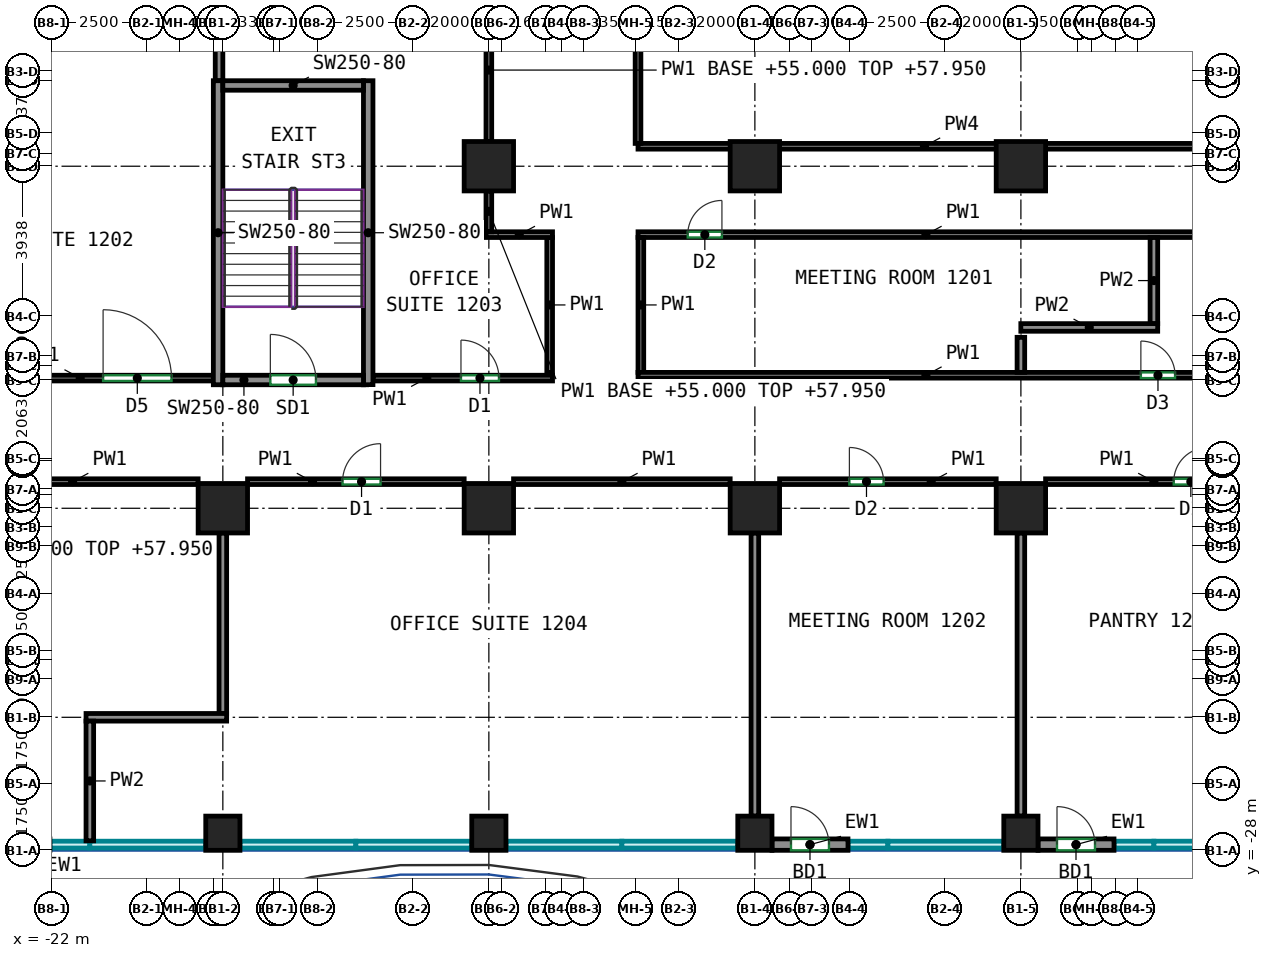
"""IFC4 building model, lengths in metres.
Left out: names, types, materials, properties, quantities, classifications, styles, units other than length and angle.
Written with IfcOpenShell. Run it as: python <this file> out.ifc"""

import sys

from ifc_helpers import new_model, si_unit, direction, frame, frame_2d, origin, origin_2d, place, context, subcontext, project, spatial, rectangle, extrude, source, transform, mapped, element, fill, save


model = new_model("IFC4")
c1 = context("Model", 3, precision=1e-05, world=origin(), true_north=direction((0.0, 1.0)))
c2 = subcontext(c1, "Body", "Model", "MODEL_VIEW")
j1 = project(units=[si_unit("LENGTHUNIT", "METRE"), si_unit("PLANEANGLEUNIT", "RADIAN")], contexts=[c1])
p1 = place(None, origin())
s1 = spatial("IfcSite", under=j1, at=p1, CompositionType="ELEMENT")
p2 = place(p1, origin())
s2 = spatial("IfcBuilding", under=s1, at=p2, CompositionType="ELEMENT")
p3 = place(p2, frame((0.0, 0.0, 55.0)))
s3 = spatial("IfcBuildingStorey", under=s2, at=p3, CompositionType="ELEMENT", Elevation=55.0)
m1 = source(origin(), c2, "Body", "SweptSolid", [
    extrude(rectangle(XDim=0.9, YDim=0.9, at=origin_2d()), origin(), (0.0, 0.0, 1.0), 3.6),
])
p4 = place(p3, frame((-17.5, -27.55, 0.0), z_axis=(0.0, 0.0, 1.0), x_axis=(1.0, 0.0, 0.0)))
e1 = element("IfcColumn", 1, at=p4, inside=s3, PredefinedType="COLUMN", context=c2, shape_type="MappedRepresentation", body=[
    mapped(m1, transform((0.0, 0.0, 0.0))),
])
m2 = source(origin(), c2, "Body", "SweptSolid", [
    extrude(rectangle(XDim=1.3, YDim=1.3, at=origin_2d()), origin(), (0.0, 0.0, 1.0), 3.6),
])
p5 = place(p3, frame((-17.5, -19.0, 0.0), z_axis=(0.0, 0.0, 1.0), x_axis=(1.0, 0.0, 0.0)))
e2 = element("IfcColumn", 2, at=p5, inside=s3, PredefinedType="COLUMN", context=c2, shape_type="MappedRepresentation", body=[
    mapped(m2, transform((0.0, 0.0, 0.0))),
])
p6 = place(p3, frame((-10.5, -27.55, 0.0), z_axis=(0.0, 0.0, 1.0), x_axis=(1.0, 0.0, 0.0)))
e3 = element("IfcColumn", 3, at=p6, inside=s3, PredefinedType="COLUMN", context=c2, shape_type="MappedRepresentation", body=[
    mapped(m1, transform((0.0, 0.0, 0.0))),
])
for number, where, z_axis, x_axis in (
    (4, (-10.5, -19.0, 0.0), (0.0, 0.0, 1.0), (1.0, 0.0, 0.0)),
    (5, (-10.5, -10.0, 0.0), (0.0, 0.0, 1.0), (1.0, 0.0, 0.0)),
):
    element("IfcColumn", number, at=place(p3, frame(where, z_axis=z_axis, x_axis=x_axis)), inside=s3, PredefinedType="COLUMN", context=c2, shape_type="MappedRepresentation", body=[
        mapped(m2, transform((0.0, 0.0, 0.0))),
    ])
p7 = place(p3, frame((-3.5, -27.55, 0.0), z_axis=(0.0, 0.0, 1.0), x_axis=(1.0, 0.0, 0.0)))
e6 = element("IfcColumn", 6, at=p7, inside=s3, PredefinedType="COLUMN", context=c2, shape_type="MappedRepresentation", body=[
    mapped(m1, transform((0.0, 0.0, 0.0))),
])
for number, where, z_axis, x_axis in (
    (7, (-3.5, -19.0, 0.0), (0.0, 0.0, 1.0), (1.0, 0.0, 0.0)),
    (8, (-3.5, -10.0, 0.0), (0.0, 0.0, 1.0), (1.0, 0.0, 0.0)),
):
    element("IfcColumn", number, at=place(p3, frame(where, z_axis=z_axis, x_axis=x_axis)), inside=s3, PredefinedType="COLUMN", context=c2, shape_type="MappedRepresentation", body=[
        mapped(m2, transform((0.0, 0.0, 0.0))),
    ])
p8 = place(p3, frame((3.5, -27.55, 0.0), z_axis=(0.0, 0.0, 1.0), x_axis=(1.0, 0.0, 0.0)))
e9 = element("IfcColumn", 9, at=p8, inside=s3, PredefinedType="COLUMN", context=c2, shape_type="MappedRepresentation", body=[
    mapped(m1, transform((0.0, 0.0, 0.0))),
])
for number, where, z_axis, x_axis in (
    (10, (3.5, -19.0, 0.0), (0.0, 0.0, 1.0), (1.0, 0.0, 0.0)),
    (11, (3.5, -10.0, 0.0), (0.0, 0.0, 1.0), (1.0, 0.0, 0.0)),
):
    element("IfcColumn", number, at=place(p3, frame(where, z_axis=z_axis, x_axis=x_axis)), inside=s3, PredefinedType="COLUMN", context=c2, shape_type="MappedRepresentation", body=[
        mapped(m2, transform((0.0, 0.0, 0.0))),
    ])
m3 = source(origin(), c2, "Body", "SweptSolid", [
    extrude(rectangle(XDim=8.0, YDim=0.25, at=frame_2d((4.0, 0.0))), origin(), (0.0, 0.0, 1.0), 3.6),
])
for number, where, z_axis, x_axis in (
    (12, (-17.625, -15.75, 0.0), (0.0, 0.0, 1.0), (0.0, 1.0, 0.0)),
    (13, (-13.675, -15.75, 0.0), (0.0, 0.0, 1.0), (0.0, 1.0, 0.0)),
):
    element("IfcWall", number, at=place(p3, frame(where, z_axis=z_axis, x_axis=x_axis)), inside=s3, PredefinedType="SHEAR", context=c2, shape_type="MappedRepresentation", body=[
        mapped(m3, transform((0.0, 0.0, 0.0))),
    ])
m4 = source(origin(), c2, "Body", "SweptSolid", [
    extrude(rectangle(XDim=3.7, YDim=0.25, at=frame_2d((1.85, 0.0))), origin(), (0.0, 0.0, 1.0), 3.6),
])
p9 = place(p3, frame((-17.5, -15.625, 0.0), z_axis=(0.0, 0.0, 1.0), x_axis=(1.0, 0.0, 0.0)))
e14 = element("IfcWall", 14, at=p9, inside=s3, PredefinedType="SHEAR", context=c2, shape_type="MappedRepresentation", body=[
    mapped(m4, transform((0.0, 0.0, 0.0))),
])
p10 = place(p9, frame((1.25, 0.0, 0.0)))
e15 = element("IfcOpeningElement", 15, at=p10, cuts=e14, PredefinedType="OPENING", context=c2, shape_type="SweptSolid", body=[
    extrude(rectangle(XDim=1.2, YDim=2.1, at=frame_2d((0.6, 1.05))), frame((0.0, 0.135, 0.0), z_axis=(0.0, -1.0, 0.0), x_axis=(1.0, 0.0, 0.0)), (0.0, 0.0, 1.0), 0.27),
])
p11 = place(p3, frame((-17.5, -7.875, 0.0), z_axis=(0.0, 0.0, 1.0), x_axis=(1.0, 0.0, 0.0)))
e16 = element("IfcWall", 16, at=p11, inside=s3, PredefinedType="SHEAR", context=c2, shape_type="MappedRepresentation", body=[
    mapped(m4, transform((0.0, 0.0, 0.0))),
])
m5 = source(origin(), c2, "Body", "SweptSolid", [
    extrude(rectangle(XDim=2.0, YDim=0.3, at=frame_2d((1.0, 0.0))), origin(), (0.0, 0.0, 1.0), 3.6),
])
p12 = place(p3, frame((-3.05, -27.85, 0.0), z_axis=(0.0, 0.0, 1.0), x_axis=(1.0, 0.0, 0.0)))
e17 = element("IfcWall", 17, at=p12, inside=s3, PredefinedType="SOLIDWALL", context=c2, shape_type="MappedRepresentation", body=[
    mapped(m5, transform((0.0, 0.0, 0.0))),
])
p13 = place(p12, frame((0.5, 0.0, 0.0)))
e18 = element("IfcOpeningElement", 18, at=p13, cuts=e17, PredefinedType="OPENING", context=c2, shape_type="SweptSolid", body=[
    extrude(rectangle(XDim=1.0, YDim=2.1, at=frame_2d((0.5, 1.05))), frame((0.0, 0.16, 0.0), z_axis=(0.0, -1.0, 0.0), x_axis=(1.0, 0.0, 0.0)), (0.0, 0.0, 1.0), 0.32),
])
p14 = place(p3, frame((3.95, -27.85, 0.0), z_axis=(0.0, 0.0, 1.0), x_axis=(1.0, 0.0, 0.0)))
e19 = element("IfcWall", 19, at=p14, inside=s3, PredefinedType="SOLIDWALL", context=c2, shape_type="MappedRepresentation", body=[
    mapped(m5, transform((0.0, 0.0, 0.0))),
])
p15 = place(p14, frame((0.5, 0.0, 0.0)))
e20 = element("IfcOpeningElement", 20, at=p15, cuts=e19, PredefinedType="OPENING", context=c2, shape_type="SweptSolid", body=[
    extrude(rectangle(XDim=1.0, YDim=2.1, at=frame_2d((0.5, 1.05))), frame((0.0, 0.16, 0.0), z_axis=(0.0, -1.0, 0.0), x_axis=(1.0, 0.0, 0.0)), (0.0, 0.0, 1.0), 0.32),
])
p16 = place(p3, frame((-24.757, -18.3, 0.0), z_axis=(0.0, 0.0, 1.0), x_axis=(1.0, 0.0, 0.0)))
e21 = element("IfcWall", 21, at=p16, inside=s3, PredefinedType="PARTITIONING", context=c2, shape_type="SweptSolid", body=[
    extrude(rectangle(XDim=6.607, YDim=0.15, at=frame_2d((3.304, 0.0))), origin(), (0.0, 0.0, 1.0), 3.6),
])
p17 = place(p3, frame((-24.757, -15.575, 0.0), z_axis=(0.0, 0.0, 1.0), x_axis=(1.0, 0.0, 0.0)))
e22 = element("IfcWall", 22, at=p17, inside=s3, PredefinedType="PARTITIONING", context=c2, shape_type="SweptSolid", body=[
    extrude(rectangle(XDim=7.007, YDim=0.15, at=frame_2d((3.503, 0.0))), origin(), (0.0, 0.0, 1.0), 3.6),
])
p18 = place(p17, frame((4.106, 0.0, 0.0)))
e23 = element("IfcOpeningElement", 23, at=p18, cuts=e22, PredefinedType="OPENING", context=c2, shape_type="SweptSolid", body=[
    extrude(rectangle(XDim=1.8, YDim=2.1, at=frame_2d((0.9, 1.05))), frame((0.0, 0.085, 0.0), z_axis=(0.0, -1.0, 0.0), x_axis=(1.0, 0.0, 0.0)), (0.0, 0.0, 1.0), 0.17),
])
p19 = place(p3, frame((-13.55, -15.575, 0.0), z_axis=(0.0, 0.0, 1.0), x_axis=(1.0, 0.0, 0.0)))
e24 = element("IfcWall", 24, at=p19, inside=s3, PredefinedType="PARTITIONING", context=c2, shape_type="SweptSolid", body=[
    extrude(rectangle(XDim=4.725, YDim=0.15, at=frame_2d((2.363, 0.0))), origin(), (0.0, 0.0, 1.0), 3.6),
])
p20 = place(p19, frame((2.316, 0.0, 0.0)))
e25 = element("IfcOpeningElement", 25, at=p20, cuts=e24, PredefinedType="OPENING", context=c2, shape_type="SweptSolid", body=[
    extrude(rectangle(XDim=1.0, YDim=2.1, at=frame_2d((0.5, 1.05))), frame((0.0, 0.085, 0.0), z_axis=(0.0, -1.0, 0.0), x_axis=(1.0, 0.0, 0.0)), (0.0, 0.0, 1.0), 0.17),
])
p21 = place(p3, frame((-8.9, -11.875, 0.0), z_axis=(0.0, 0.0, 1.0), x_axis=(0.0, -1.0, 0.0)))
e26 = element("IfcWall", 26, at=p21, inside=s3, PredefinedType="PARTITIONING", context=c2, shape_type="SweptSolid", body=[
    extrude(rectangle(XDim=3.55, YDim=0.15, at=frame_2d((1.775, 0.0))), origin(), (0.0, 0.0, 1.0), 3.6),
])
p22 = place(p3, frame((-10.575, -11.8, 0.0), z_axis=(0.0, 0.0, 1.0), x_axis=(1.0, 0.0, 0.0)))
e27 = element("IfcWall", 27, at=p22, inside=s3, PredefinedType="PARTITIONING", context=c2, shape_type="SweptSolid", body=[
    extrude(rectangle(XDim=1.75, YDim=0.15, at=frame_2d((0.875, 0.0))), origin(), (0.0, 0.0, 1.0), 3.6),
])
p23 = place(p3, frame((-10.5, -11.725, 0.0), z_axis=(0.0, 0.0, 1.0), x_axis=(0.0, 1.0, 0.0)))
e28 = element("IfcWall", 28, at=p23, inside=s3, PredefinedType="PARTITIONING", context=c2, shape_type="SweptSolid", body=[
    extrude(rectangle(XDim=1.075, YDim=0.15, at=frame_2d((0.538, 0.0))), origin(), (0.0, 0.0, 1.0), 2.95),
])
p24 = place(p3, frame((-10.5, -9.35, 0.0), z_axis=(0.0, 0.0, 1.0), x_axis=(0.0, 1.0, 0.0)))
e29 = element("IfcWall", 29, at=p24, inside=s3, PredefinedType="PARTITIONING", context=c2, shape_type="SweptSolid", body=[
    extrude(rectangle(XDim=3.76, YDim=0.15, at=frame_2d((1.88, 0.0))), origin(), (0.0, 0.0, 1.0), 2.95),
])
p25 = place(p3, frame((-16.85, -18.3, 0.0), z_axis=(0.0, 0.0, 1.0), x_axis=(1.0, 0.0, 0.0)))
e30 = element("IfcWall", 30, at=p25, inside=s3, PredefinedType="PARTITIONING", context=c2, shape_type="SweptSolid", body=[
    extrude(rectangle(XDim=5.7, YDim=0.15, at=frame_2d((2.85, 0.0))), origin(), (0.0, 0.0, 1.0), 3.6),
])
p26 = place(p25, frame((2.5, 0.0, 0.0)))
e31 = element("IfcOpeningElement", 31, at=p26, cuts=e30, PredefinedType="OPENING", context=c2, shape_type="SweptSolid", body=[
    extrude(rectangle(XDim=1.0, YDim=2.1, at=frame_2d((0.5, 1.05))), frame((0.0, 0.085, 0.0), z_axis=(0.0, -1.0, 0.0), x_axis=(1.0, 0.0, 0.0)), (0.0, 0.0, 1.0), 0.17),
])
p27 = place(p3, frame((-9.85, -18.3, 0.0), z_axis=(0.0, 0.0, 1.0), x_axis=(1.0, 0.0, 0.0)))
e32 = element("IfcWall", 32, at=p27, inside=s3, PredefinedType="PARTITIONING", context=c2, shape_type="SweptSolid", body=[
    extrude(rectangle(XDim=5.7, YDim=0.15, at=frame_2d((2.85, 0.0))), origin(), (0.0, 0.0, 1.0), 3.6),
])
p28 = place(p3, frame((-6.575, -11.8, 0.0), z_axis=(0.0, 0.0, 1.0), x_axis=(1.0, 0.0, 0.0)))
e33 = element("IfcWall", 33, at=p28, inside=s3, PredefinedType="PARTITIONING", context=c2, shape_type="SweptSolid", body=[
    extrude(rectangle(XDim=15.15, YDim=0.15, at=frame_2d((7.575, 0.0))), origin(), (0.0, 0.0, 1.0), 3.6),
])
p29 = place(p28, frame((1.308, 0.0, 0.0)))
e34 = element("IfcOpeningElement", 34, at=p29, cuts=e33, PredefinedType="OPENING", context=c2, shape_type="SweptSolid", body=[
    extrude(rectangle(XDim=0.9, YDim=2.1, at=frame_2d((0.45, 1.05))), frame((0.0, 0.085, 0.0), z_axis=(0.0, -1.0, 0.0), x_axis=(1.0, 0.0, 0.0)), (0.0, 0.0, 1.0), 0.17),
])
p30 = place(p3, frame((-6.5, -15.425, 0.0), z_axis=(0.0, 0.0, 1.0), x_axis=(0.0, 1.0, 0.0)))
e35 = element("IfcWall", 35, at=p30, inside=s3, PredefinedType="PARTITIONING", context=c2, shape_type="SweptSolid", body=[
    extrude(rectangle(XDim=3.55, YDim=0.15, at=frame_2d((1.775, 0.0))), origin(), (0.0, 0.0, 1.0), 3.6),
])
p31 = place(p3, frame((-6.575, -15.5, 0.0), z_axis=(0.0, 0.0, 1.0), x_axis=(1.0, 0.0, 0.0)))
e36 = element("IfcWall", 36, at=p31, inside=s3, PredefinedType="PARTITIONING", context=c2, shape_type="SweptSolid", body=[
    extrude(rectangle(XDim=15.15, YDim=0.15, at=frame_2d((7.575, 0.0))), origin(), (0.0, 0.0, 1.0), 3.6),
])
p32 = place(p31, frame((13.232, 0.0, 0.0)))
e37 = element("IfcOpeningElement", 37, at=p32, cuts=e36, PredefinedType="OPENING", context=c2, shape_type="SweptSolid", body=[
    extrude(rectangle(XDim=0.9, YDim=2.1, at=frame_2d((0.45, 1.05))), frame((0.0, 0.085, 0.0), z_axis=(0.0, -1.0, 0.0), x_axis=(1.0, 0.0, 0.0)), (0.0, 0.0, 1.0), 0.17),
])
p33 = place(p3, frame((-2.85, -18.3, 0.0), z_axis=(0.0, 0.0, 1.0), x_axis=(1.0, 0.0, 0.0)))
e38 = element("IfcWall", 38, at=p33, inside=s3, PredefinedType="PARTITIONING", context=c2, shape_type="SweptSolid", body=[
    extrude(rectangle(XDim=5.7, YDim=0.15, at=frame_2d((2.85, 0.0))), origin(), (0.0, 0.0, 1.0), 3.6),
])
p34 = place(p33, frame((1.837, 0.0, 0.0)))
e39 = element("IfcOpeningElement", 39, at=p34, cuts=e38, PredefinedType="OPENING", context=c2, shape_type="SweptSolid", body=[
    extrude(rectangle(XDim=0.9, YDim=2.1, at=frame_2d((0.45, 1.05))), frame((0.0, 0.085, 0.0), z_axis=(0.0, -1.0, 0.0), x_axis=(1.0, 0.0, 0.0)), (0.0, 0.0, 1.0), 0.17),
])
p35 = place(p3, frame((4.15, -18.3, 0.0), z_axis=(0.0, 0.0, 1.0), x_axis=(1.0, 0.0, 0.0)))
e40 = element("IfcWall", 40, at=p35, inside=s3, PredefinedType="PARTITIONING", context=c2, shape_type="SweptSolid", body=[
    extrude(rectangle(XDim=5.7, YDim=0.15, at=frame_2d((2.85, 0.0))), origin(), (0.0, 0.0, 1.0), 3.6),
])
p36 = place(p35, frame((3.372, 0.0, 0.0)))
e41 = element("IfcOpeningElement", 41, at=p36, cuts=e40, PredefinedType="OPENING", context=c2, shape_type="SweptSolid", body=[
    extrude(rectangle(XDim=0.9, YDim=2.1, at=frame_2d((0.45, 1.05))), frame((0.0, 0.085, 0.0), z_axis=(0.0, -1.0, 0.0), x_axis=(1.0, 0.0, 0.0)), (0.0, 0.0, 1.0), 0.17),
])
p37 = place(p3, frame((-17.6, -7.75, 0.0), z_axis=(0.0, 0.0, 1.0), x_axis=(0.0, 1.0, 0.0)))
e42 = element("IfcWall", 42, at=p37, inside=s3, PredefinedType="PARTITIONING", context=c2, shape_type="SweptSolid", body=[
    extrude(rectangle(XDim=2.15, YDim=0.2, at=frame_2d((1.075, 0.0))), origin(), (0.0, 0.0, 1.0), 3.6),
])
p38 = place(p3, frame((-17.5, -24.4, 0.0), z_axis=(0.0, 0.0, 1.0), x_axis=(0.0, 1.0, 0.0)))
e43 = element("IfcWall", 43, at=p38, inside=s3, PredefinedType="PARTITIONING", context=c2, shape_type="SweptSolid", body=[
    extrude(rectangle(XDim=4.75, YDim=0.2, at=frame_2d((2.375, 0.0))), origin(), (0.0, 0.0, 1.0), 2.95),
])
p39 = place(p3, frame((-21.1, -24.5, 0.0), z_axis=(0.0, 0.0, 1.0), x_axis=(1.0, 0.0, 0.0)))
e44 = element("IfcWall", 44, at=p39, inside=s3, PredefinedType="PARTITIONING", context=c2, shape_type="SweptSolid", body=[
    extrude(rectangle(XDim=3.7, YDim=0.2, at=frame_2d((1.85, 0.0))), origin(), (0.0, 0.0, 1.0), 2.95),
])
p40 = place(p3, frame((-21.0, -27.75, 0.0), z_axis=(0.0, 0.0, 1.0), x_axis=(0.0, 1.0, 0.0)))
e45 = element("IfcWall", 45, at=p40, inside=s3, PredefinedType="PARTITIONING", context=c2, shape_type="SweptSolid", body=[
    extrude(rectangle(XDim=3.15, YDim=0.2, at=frame_2d((1.575, 0.0))), origin(), (0.0, 0.0, 1.0), 3.6),
])
p41 = place(p3, frame((-3.5, -27.1, 0.0), z_axis=(0.0, 0.0, 1.0), x_axis=(0.0, 1.0, 0.0)))
e46 = element("IfcWall", 46, at=p41, inside=s3, PredefinedType="PARTITIONING", context=c2, shape_type="SweptSolid", body=[
    extrude(rectangle(XDim=7.45, YDim=0.2, at=frame_2d((3.725, 0.0))), origin(), (0.0, 0.0, 1.0), 2.95),
])
p42 = place(p3, frame((7.0, -14.142, 0.0), z_axis=(0.0, 0.0, 1.0), x_axis=(0.0, 1.0, 0.0)))
e47 = element("IfcWall", 47, at=p42, inside=s3, PredefinedType="PARTITIONING", context=c2, shape_type="SweptSolid", body=[
    extrude(rectangle(XDim=2.266, YDim=0.2, at=frame_2d((1.133, 0.0))), origin(), (0.0, 0.0, 1.0), 3.6),
])
p43 = place(p3, frame((3.498, -14.242, 0.0), z_axis=(0.0, 0.0, 1.0), x_axis=(1.0, 0.0, 0.0)))
e48 = element("IfcWall", 48, at=p43, inside=s3, PredefinedType="PARTITIONING", context=c2, shape_type="SweptSolid", body=[
    extrude(rectangle(XDim=3.602, YDim=0.2, at=frame_2d((1.801, 0.0))), origin(), (0.0, 0.0, 1.0), 3.6),
])
p44 = place(p3, frame((3.5, -15.424, 0.0), z_axis=(0.0, 0.0, 1.0), x_axis=(0.0, 1.0, 0.0)))
e49 = element("IfcWall", 49, at=p44, inside=s3, PredefinedType="PARTITIONING", context=c2, shape_type="SweptSolid", body=[
    extrude(rectangle(XDim=0.922, YDim=0.2, at=frame_2d((0.461, 0.0))), origin(), (0.0, 0.0, 1.0), 2.95),
])
p45 = place(p3, frame((3.5, -27.1, 0.0), z_axis=(0.0, 0.0, 1.0), x_axis=(0.0, 1.0, 0.0)))
e50 = element("IfcWall", 50, at=p45, inside=s3, PredefinedType="PARTITIONING", context=c2, shape_type="SweptSolid", body=[
    extrude(rectangle(XDim=7.45, YDim=0.2, at=frame_2d((3.725, 0.0))), origin(), (0.0, 0.0, 1.0), 2.95),
])
p46 = place(p3, frame((8.5, -9.475, 0.0), z_axis=(0.0, 0.0, 1.0), x_axis=(-1.0, 0.0, 0.0)))
e51 = element("IfcWall", 51, at=p46, inside=s3, PredefinedType="PARTITIONING", context=c2, shape_type="SweptSolid", body=[
    extrude(rectangle(XDim=15.075, YDim=0.15, at=frame_2d((7.538, 0.0))), origin(), (0.0, 0.0, 1.0), 3.6),
])
p47 = place(p3, frame((-6.575, -9.4, 0.0), z_axis=(0.0, 0.0, 1.0), x_axis=(0.0, 1.0, 0.0)))
e52 = element("IfcWall", 52, at=p47, inside=s3, PredefinedType="PARTITIONING", context=c2, shape_type="SweptSolid", body=[
    extrude(rectangle(XDim=15.0, YDim=0.15, at=frame_2d((7.5, 0.0))), origin(), (0.0, 0.0, 1.0), 3.6),
])
p48 = place(p13, origin())
e53 = element("IfcDoor", 53, at=p48, inside=s3, OperationType="SINGLE_SWING_LEFT", PredefinedType="DOOR", context=c2, shape_type="SweptSolid", body=[
    extrude(rectangle(XDim=1.0, YDim=2.1, at=frame_2d((0.5, 1.05))), frame((0.0, 0.025, 0.0), z_axis=(0.0, -1.0, 0.0), x_axis=(1.0, 0.0, 0.0)), (0.0, 0.0, 1.0), 0.05),
])
fill(e18, e53)
p49 = place(p15, origin())
e54 = element("IfcDoor", 54, at=p49, inside=s3, OperationType="SINGLE_SWING_LEFT", PredefinedType="DOOR", context=c2, shape_type="SweptSolid", body=[
    extrude(rectangle(XDim=1.0, YDim=2.1, at=frame_2d((0.5, 1.05))), frame((0.0, 0.025, 0.0), z_axis=(0.0, -1.0, 0.0), x_axis=(1.0, 0.0, 0.0)), (0.0, 0.0, 1.0), 0.05),
])
fill(e20, e54)
p50 = place(p10, origin())
e55 = element("IfcDoor", 55, at=p50, inside=s3, OperationType="DOUBLE_DOOR_SINGLE_SWING", PredefinedType="DOOR", context=c2, shape_type="SweptSolid", body=[
    extrude(rectangle(XDim=1.2, YDim=2.1, at=frame_2d((0.6, 1.05))), frame((0.0, 0.025, 0.0), z_axis=(0.0, -1.0, 0.0), x_axis=(1.0, 0.0, 0.0)), (0.0, 0.0, 1.0), 0.05),
])
fill(e15, e55)
p51 = place(p26, origin())
e56 = element("IfcDoor", 56, at=p51, inside=s3, OperationType="SINGLE_SWING_RIGHT", PredefinedType="DOOR", context=c2, shape_type="SweptSolid", body=[
    extrude(rectangle(XDim=1.0, YDim=2.1, at=frame_2d((0.5, 1.05))), frame((0.0, 0.025, 0.0), z_axis=(0.0, -1.0, 0.0), x_axis=(1.0, 0.0, 0.0)), (0.0, 0.0, 1.0), 0.05),
])
fill(e31, e56)
p52 = place(p34, origin())
e57 = element("IfcDoor", 57, at=p52, inside=s3, OperationType="SINGLE_SWING_LEFT", PredefinedType="DOOR", context=c2, shape_type="SweptSolid", body=[
    extrude(rectangle(XDim=0.9, YDim=2.1, at=frame_2d((0.45, 1.05))), frame((0.0, 0.025, 0.0), z_axis=(0.0, -1.0, 0.0), x_axis=(1.0, 0.0, 0.0)), (0.0, 0.0, 1.0), 0.05),
])
fill(e39, e57)
p53 = place(p36, origin())
e58 = element("IfcDoor", 58, at=p53, inside=s3, OperationType="SINGLE_SWING_RIGHT", PredefinedType="DOOR", context=c2, shape_type="SweptSolid", body=[
    extrude(rectangle(XDim=0.9, YDim=2.1, at=frame_2d((0.45, 1.05))), frame((0.0, 0.025, 0.0), z_axis=(0.0, -1.0, 0.0), x_axis=(1.0, 0.0, 0.0)), (0.0, 0.0, 1.0), 0.05),
])
fill(e41, e58)
p54 = place(p18, origin())
e59 = element("IfcDoor", 59, at=p54, inside=s3, OperationType="DOUBLE_DOOR_SINGLE_SWING", PredefinedType="DOOR", context=c2, shape_type="SweptSolid", body=[
    extrude(rectangle(XDim=1.8, YDim=2.1, at=frame_2d((0.9, 1.05))), frame((0.0, 0.025, 0.0), z_axis=(0.0, -1.0, 0.0), x_axis=(1.0, 0.0, 0.0)), (0.0, 0.0, 1.0), 0.05),
])
fill(e23, e59)
p55 = place(p20, origin())
e60 = element("IfcDoor", 60, at=p55, inside=s3, OperationType="SINGLE_SWING_LEFT", PredefinedType="DOOR", context=c2, shape_type="SweptSolid", body=[
    extrude(rectangle(XDim=1.0, YDim=2.1, at=frame_2d((0.5, 1.05))), frame((0.0, 0.025, 0.0), z_axis=(0.0, -1.0, 0.0), x_axis=(1.0, 0.0, 0.0)), (0.0, 0.0, 1.0), 0.05),
])
fill(e25, e60)
p56 = place(p32, origin())
e61 = element("IfcDoor", 61, at=p56, inside=s3, OperationType="SINGLE_SWING_LEFT", PredefinedType="DOOR", context=c2, shape_type="SweptSolid", body=[
    extrude(rectangle(XDim=0.9, YDim=2.1, at=frame_2d((0.45, 1.05))), frame((0.0, 0.025, 0.0), z_axis=(0.0, -1.0, 0.0), x_axis=(1.0, 0.0, 0.0)), (0.0, 0.0, 1.0), 0.05),
])
fill(e37, e61)
p57 = place(p29, origin())
e62 = element("IfcDoor", 62, at=p57, inside=s3, OperationType="SINGLE_SWING_RIGHT", PredefinedType="DOOR", context=c2, shape_type="SweptSolid", body=[
    extrude(rectangle(XDim=0.9, YDim=2.1, at=frame_2d((0.45, 1.05))), frame((0.0, 0.025, 0.0), z_axis=(0.0, -1.0, 0.0), x_axis=(1.0, 0.0, 0.0)), (0.0, 0.0, 1.0), 0.05),
])
fill(e34, e62)
save(model, sys.argv[1])
